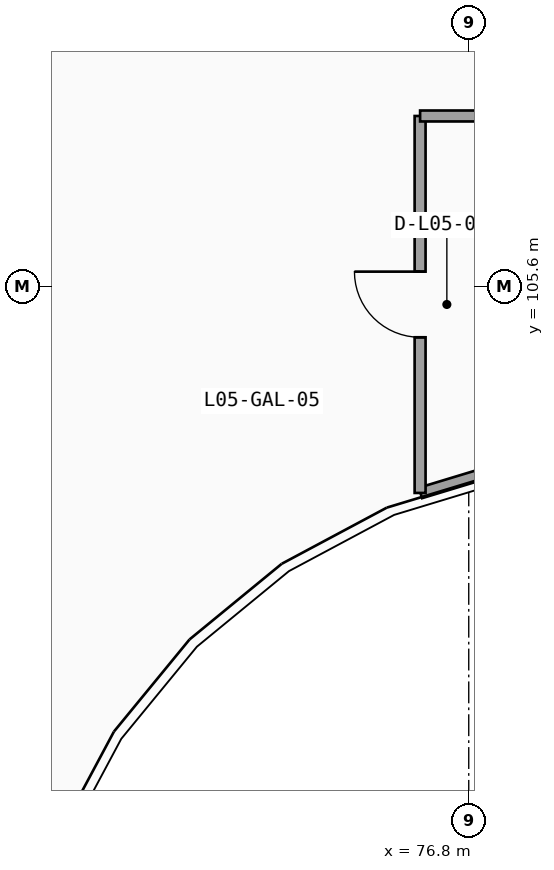
"""IFC4 building model, lengths in metres.
Left out: names, types, materials, properties, quantities, classifications, styles, units other than length and angle.
Written with IfcOpenShell. Run it as: python <this file> out.ifc"""

import sys

from ifc_helpers import new_model, si_unit, direction, frame, frame_2d, origin, place, context, subcontext, project, spatial, rectangle, extrude, element, fill, save


model = new_model("IFC4")
c1 = context("Model", 3, precision=1e-05, world=origin(), true_north=direction((0.0, 1.0)))
c2 = subcontext(c1, "Body", "Model", "MODEL_VIEW")
j1 = project(units=[si_unit("LENGTHUNIT", "METRE"), si_unit("PLANEANGLEUNIT", "RADIAN")], contexts=[c1])
p1 = place(None, origin())
s1 = spatial("IfcSite", under=j1, at=p1, CompositionType="ELEMENT")
p2 = place(p1, origin())
s2 = spatial("IfcBuilding", under=s1, at=p2, CompositionType="ELEMENT")
p3 = place(p2, frame((0.0, 0.0, 23.1)))
s3 = spatial("IfcBuildingStorey", under=s2, at=p3, CompositionType="ELEMENT", Elevation=23.1)
p4 = place(p3, frame((77.385, 102.618, 0.0), z_axis=(0.0, 0.0, 1.0), x_axis=(-0.956921766266, -0.290345885534, 0.0)))
e1 = element("IfcWall", 1, at=p4, inside=s3, PredefinedType="PARTITIONING", context=c2, shape_type="SweptSolid", body=[
    extrude(rectangle(XDim=1.441, YDim=0.18, at=frame_2d((0.721, 0.0))), origin(), (0.0, 0.0, 1.0), 4.82),
])
p5 = place(p3, frame((76.0, 102.2, 0.0), z_axis=(0.0, 0.0, 1.0), x_axis=(0.0, 1.0, 0.0)))
e2 = element("IfcWall", 2, at=p5, inside=s3, PredefinedType="PARTITIONING", context=c2, shape_type="SweptSolid", body=[
    extrude(rectangle(XDim=6.2, YDim=0.18, at=frame_2d((3.1, 0.0))), origin(), (0.0, 0.0, 1.0), 4.82),
])
p6 = place(p5, frame((2.56, 0.0, 0.0), z_axis=(0.0, 0.0, 1.0), x_axis=(1.0, 0.0, 0.0)))
e3 = element("IfcOpeningElement", 3, at=p6, cuts=e2, PredefinedType="OPENING", context=c2, shape_type="SweptSolid", body=[
    extrude(rectangle(XDim=1.08, YDim=2.22, at=frame_2d((0.54, 1.11))), frame((0.0, 0.1, 0.0), z_axis=(0.0, -1.0, 0.0), x_axis=(1.0, 0.0, 0.0)), (0.0, 0.0, 1.0), 0.2),
])
p7 = place(p3, frame((76.0, 108.4, 0.0), z_axis=(0.0, 0.0, 1.0), x_axis=(1.0, 0.0, 0.0)))
e4 = element("IfcWall", 4, at=p7, inside=s3, PredefinedType="PARTITIONING", context=c2, shape_type="SweptSolid", body=[
    extrude(rectangle(XDim=2.35, YDim=0.18, at=frame_2d((1.175, 0.0))), origin(), (0.0, 0.0, 1.0), 4.82),
])
p8 = place(p6, origin())
e5 = element("IfcDoor", 5, at=p8, inside=s3, OperationType="SINGLE_SWING_RIGHT", PredefinedType="DOOR", context=c2, shape_type="SweptSolid", body=[
    extrude(rectangle(XDim=1.08, YDim=2.22, at=frame_2d((0.54, 1.11))), frame((0.0, 0.025, 0.0), z_axis=(0.0, -1.0, 0.0), x_axis=(1.0, 0.0, 0.0)), (0.0, 0.0, 1.0), 0.05),
])
fill(e3, e5)
save(model, sys.argv[1])
